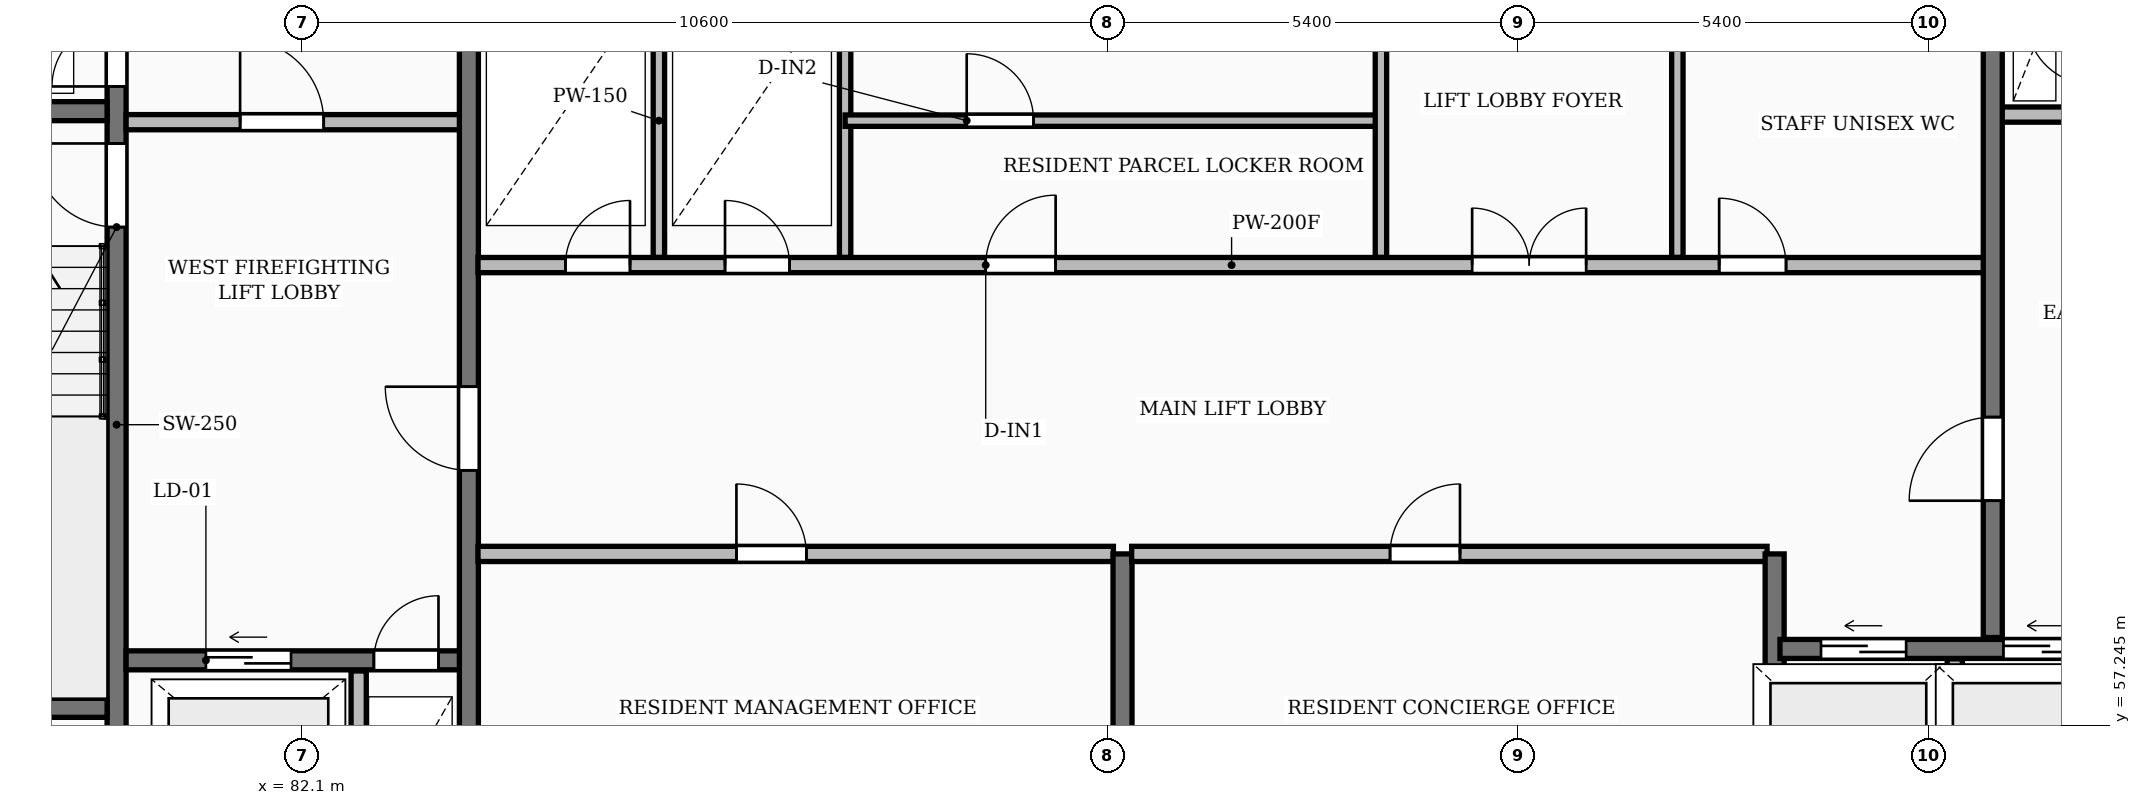
"""IFC4 building model, lengths in metres.
Left out: names, types, materials, properties, quantities, classifications, styles, units other than length and angle.
Written with IfcOpenShell. Run it as: python <this file> out.ifc"""

import sys

from ifc_helpers import new_model, si_unit, direction, frame, frame_2d, origin, place, context, subcontext, project, spatial, rectangle, extrude, element, fill, save


model = new_model("IFC4")
c1 = context("Model", 3, precision=1e-05, world=origin(), true_north=direction((0.0, 1.0)))
c2 = subcontext(c1, "Body", "Model", "MODEL_VIEW")
j1 = project(units=[si_unit("LENGTHUNIT", "METRE"), si_unit("PLANEANGLEUNIT", "RADIAN")], contexts=[c1])
p1 = place(None, origin())
s1 = spatial("IfcSite", under=j1, at=p1, CompositionType="ELEMENT")
p2 = place(p1, origin())
s2 = spatial("IfcBuilding", under=s1, at=p2, CompositionType="ELEMENT")
p3 = place(p2, frame((0.0, 0.0, 214.1)))
s3 = spatial("IfcBuildingStorey", under=s2, at=p3, CompositionType="ELEMENT", Elevation=214.1)
p4 = place(p3, frame((79.665, 55.4, 0.0), z_axis=(0.0, 0.0, 1.0), x_axis=(0.0, 1.0, 0.0)))
e1 = element("IfcWall", 1, at=p4, inside=s3, PredefinedType="SHEAR", context=c2, shape_type="SweptSolid", body=[
    extrude(rectangle(XDim=11.6, YDim=0.25, at=frame_2d((5.8, 0.0))), origin(), (0.0, 0.0, 1.0), 3.25),
])
p5 = place(p4, frame((0.55, 0.0, 0.0)))
e2 = element("IfcOpeningElement", 2, at=p5, cuts=e1, PredefinedType="OPENING", context=c2, shape_type="SweptSolid", body=[
    extrude(rectangle(XDim=0.85, YDim=2.05, at=frame_2d((0.425, 1.025))), frame((0.0, 0.135, 0.0), z_axis=(0.0, -1.0, 0.0), x_axis=(1.0, 0.0, 0.0)), (0.0, 0.0, 1.0), 0.27),
])
p6 = place(p4, frame((8.4, 0.0, 0.0)))
e3 = element("IfcOpeningElement", 3, at=p6, cuts=e1, PredefinedType="OPENING", context=c2, shape_type="SweptSolid", body=[
    extrude(rectangle(XDim=1.1, YDim=2.1, at=frame_2d((0.55, 1.05))), frame((0.0, 0.135, 0.0), z_axis=(0.0, -1.0, 0.0), x_axis=(1.0, 0.0, 0.0)), (0.0, 0.0, 1.0), 0.27),
])
p7 = place(p4, frame((10.25, 0.0, 0.0)))
e4 = element("IfcOpeningElement", 4, at=p7, cuts=e1, PredefinedType="OPENING", context=c2, shape_type="SweptSolid", body=[
    extrude(rectangle(XDim=0.85, YDim=2.05, at=frame_2d((0.425, 1.025))), frame((0.0, 0.135, 0.0), z_axis=(0.0, -1.0, 0.0), x_axis=(1.0, 0.0, 0.0)), (0.0, 0.0, 1.0), 0.27),
])
for number, where, z_axis, x_axis in (
    (5, (76.3, 57.475, 0.0), (0.0, 0.0, 1.0), (1.0, 0.0, 0.0)),
    (6, (76.3, 65.325, 0.0), (0.0, 0.0, 1.0), (1.0, 0.0, 0.0)),
):
    element("IfcWall", number, at=place(p3, frame(where, z_axis=z_axis, x_axis=x_axis)), inside=s3, PredefinedType="SHEAR", context=c2, shape_type="SweptSolid", body=[
        extrude(rectangle(XDim=3.24, YDim=0.25, at=frame_2d((1.62, 0.0))), origin(), (0.0, 0.0, 1.0), 3.25),
    ])
p8 = place(p3, frame((79.79, 58.1, 0.0), z_axis=(0.0, 0.0, 1.0), x_axis=(1.0, 0.0, 0.0)))
e7 = element("IfcWall", 7, at=p8, inside=s3, PredefinedType="SHEAR", context=c2, shape_type="SweptSolid", body=[
    extrude(rectangle(XDim=4.39, YDim=0.25, at=frame_2d((2.195, 0.0))), origin(), (0.0, 0.0, 1.0), 3.25),
])
p9 = place(p8, frame((1.05, 0.0, 0.0)))
e8 = element("IfcOpeningElement", 8, at=p9, cuts=e7, PredefinedType="OPENING", context=c2, shape_type="SweptSolid", body=[
    extrude(rectangle(XDim=1.12, YDim=2.12, at=frame_2d((0.56, 1.06))), frame((0.0, 0.135, 0.0), z_axis=(0.0, -1.0, 0.0), x_axis=(1.0, 0.0, 0.0)), (0.0, 0.0, 1.0), 0.27),
])
p10 = place(p8, frame((3.26, 0.0, 0.0)))
e9 = element("IfcOpeningElement", 9, at=p10, cuts=e7, PredefinedType="OPENING", context=c2, shape_type="SweptSolid", body=[
    extrude(rectangle(XDim=0.85, YDim=2.05, at=frame_2d((0.425, 1.025))), frame((0.0, 0.135, 0.0), z_axis=(0.0, -1.0, 0.0), x_axis=(1.0, 0.0, 0.0)), (0.0, 0.0, 1.0), 0.27),
])
p11 = place(p3, frame((82.85, 55.4, 0.0), z_axis=(0.0, 0.0, 1.0), x_axis=(0.0, 1.0, 0.0)))
e10 = element("IfcWall", 10, at=p11, inside=s3, PredefinedType="PARTITIONING", context=c2, shape_type="SweptSolid", body=[
    extrude(rectangle(XDim=2.56, YDim=0.2, at=frame_2d((1.28, 0.0))), origin(), (0.0, 0.0, 1.0), 2.97),
])
p12 = place(p3, frame((79.79, 65.18, 0.0), z_axis=(0.0, 0.0, 1.0), x_axis=(1.0, 0.0, 0.0)))
e11 = element("IfcWall", 11, at=p12, inside=s3, PredefinedType="PARTITIONING", context=c2, shape_type="SweptSolid", body=[
    extrude(rectangle(XDim=4.39, YDim=0.2, at=frame_2d((2.195, 0.0))), origin(), (0.0, 0.0, 1.0), 2.97),
])
p13 = place(p12, frame((1.5, 0.0, 0.0)))
e12 = element("IfcOpeningElement", 12, at=p13, cuts=e11, PredefinedType="OPENING", context=c2, shape_type="SweptSolid", body=[
    extrude(rectangle(XDim=1.1, YDim=2.1, at=frame_2d((0.55, 1.05))), frame((0.0, 0.11, 0.0), z_axis=(0.0, -1.0, 0.0), x_axis=(1.0, 0.0, 0.0)), (0.0, 0.0, 1.0), 0.22),
])
p14 = place(p3, frame((84.3, 55.4, 0.0), z_axis=(0.0, 0.0, 1.0), x_axis=(0.0, 1.0, 0.0)))
e13 = element("IfcWall", 13, at=p14, inside=s3, PredefinedType="SHEAR", context=c2, shape_type="SweptSolid", body=[
    extrude(rectangle(XDim=11.6, YDim=0.25, at=frame_2d((5.8, 0.0))), origin(), (0.0, 0.0, 1.0), 3.25),
])
p15 = place(p14, frame((5.2, 0.0, 0.0)))
e14 = element("IfcOpeningElement", 14, at=p15, cuts=e13, PredefinedType="OPENING", context=c2, shape_type="SweptSolid", body=[
    extrude(rectangle(XDim=1.1, YDim=2.1, at=frame_2d((0.55, 1.05))), frame((0.0, 0.135, 0.0), z_axis=(0.0, -1.0, 0.0), x_axis=(1.0, 0.0, 0.0)), (0.0, 0.0, 1.0), 0.27),
])
p16 = place(p3, frame((84.42, 59.5, 0.0), z_axis=(0.0, 0.0, 1.0), x_axis=(1.0, 0.0, 0.0)))
e15 = element("IfcWall", 15, at=p16, inside=s3, PredefinedType="PARTITIONING", context=c2, shape_type="SweptSolid", body=[
    extrude(rectangle(XDim=8.36, YDim=0.2, at=frame_2d((4.18, 0.0))), origin(), (0.0, 0.0, 1.0), 2.97),
])
p17 = place(p16, frame((3.4, 0.0, 0.0)))
e16 = element("IfcOpeningElement", 16, at=p17, cuts=e15, PredefinedType="OPENING", context=c2, shape_type="SweptSolid", body=[
    extrude(rectangle(XDim=0.92, YDim=2.08, at=frame_2d((0.46, 1.04))), frame((0.0, 0.11, 0.0), z_axis=(0.0, -1.0, 0.0), x_axis=(1.0, 0.0, 0.0)), (0.0, 0.0, 1.0), 0.22),
])
p18 = place(p3, frame((92.9, 55.4, 0.0), z_axis=(0.0, 0.0, 1.0), x_axis=(0.0, 1.0, 0.0)))
e17 = element("IfcWall", 17, at=p18, inside=s3, PredefinedType="SHEAR", context=c2, shape_type="SweptSolid", body=[
    extrude(rectangle(XDim=4.1, YDim=0.25, at=frame_2d((2.05, 0.0))), origin(), (0.0, 0.0, 1.0), 3.25),
])
p19 = place(p3, frame((93.02, 59.5, 0.0), z_axis=(0.0, 0.0, 1.0), x_axis=(1.0, 0.0, 0.0)))
e18 = element("IfcWall", 18, at=p19, inside=s3, PredefinedType="PARTITIONING", context=c2, shape_type="SweptSolid", body=[
    extrude(rectangle(XDim=8.36, YDim=0.2, at=frame_2d((4.18, 0.0))), origin(), (0.0, 0.0, 1.0), 2.97),
])
p20 = place(p19, frame((3.4, 0.0, 0.0)))
e19 = element("IfcOpeningElement", 19, at=p20, cuts=e18, PredefinedType="OPENING", context=c2, shape_type="SweptSolid", body=[
    extrude(rectangle(XDim=0.92, YDim=2.08, at=frame_2d((0.46, 1.04))), frame((0.0, 0.11, 0.0), z_axis=(0.0, -1.0, 0.0), x_axis=(1.0, 0.0, 0.0)), (0.0, 0.0, 1.0), 0.22),
])
p21 = place(p3, frame((101.48, 55.4, 0.0), z_axis=(0.0, 0.0, 1.0), x_axis=(0.0, 1.0, 0.0)))
e20 = element("IfcWall", 20, at=p21, inside=s3, PredefinedType="SHEAR", context=c2, shape_type="SweptSolid", body=[
    extrude(rectangle(XDim=4.1, YDim=0.25, at=frame_2d((2.05, 0.0))), origin(), (0.0, 0.0, 1.0), 3.25),
])
p22 = place(p3, frame((103.85, 55.4, 0.0), z_axis=(0.0, 0.0, 1.0), x_axis=(0.0, 1.0, 0.0)))
e21 = element("IfcWall", 21, at=p22, inside=s3, PredefinedType="PARTITIONING", context=c2, shape_type="SweptSolid", body=[
    extrude(rectangle(XDim=2.72, YDim=0.2, at=frame_2d((1.36, 0.0))), origin(), (0.0, 0.0, 1.0), 2.97),
])
p23 = place(p3, frame((101.55, 58.25, 0.0), z_axis=(0.0, 0.0, 1.0), x_axis=(1.0, 0.0, 0.0)))
e22 = element("IfcWall", 22, at=p23, inside=s3, PredefinedType="SHEAR", context=c2, shape_type="SweptSolid", body=[
    extrude(rectangle(XDim=4.6, YDim=0.25, at=frame_2d((2.3, 0.0))), origin(), (0.0, 0.0, 1.0), 3.25),
])
p24 = place(p23, frame((0.54, 0.0, 0.0)))
e23 = element("IfcOpeningElement", 23, at=p24, cuts=e22, PredefinedType="OPENING", context=c2, shape_type="SweptSolid", body=[
    extrude(rectangle(XDim=1.12, YDim=2.12, at=frame_2d((0.56, 1.06))), frame((0.0, 0.135, 0.0), z_axis=(0.0, -1.0, 0.0), x_axis=(1.0, 0.0, 0.0)), (0.0, 0.0, 1.0), 0.27),
])
p25 = place(p23, frame((2.94, 0.0, 0.0)))
e24 = element("IfcOpeningElement", 24, at=p25, cuts=e22, PredefinedType="OPENING", context=c2, shape_type="SweptSolid", body=[
    extrude(rectangle(XDim=1.12, YDim=2.12, at=frame_2d((0.56, 1.06))), frame((0.0, 0.135, 0.0), z_axis=(0.0, -1.0, 0.0), x_axis=(1.0, 0.0, 0.0)), (0.0, 0.0, 1.0), 0.27),
])
for number, where, z_axis, x_axis in (
    (25, (86.8, 63.4, 0.0), (0.0, 0.0, 1.0), (0.0, 1.0, 0.0)),
    (26, (89.25, 63.4, 0.0), (0.0, 0.0, 1.0), (0.0, 1.0, 0.0)),
):
    element("IfcWall", number, at=place(p3, frame(where, z_axis=z_axis, x_axis=x_axis)), inside=s3, PredefinedType="PARTITIONING", context=c2, shape_type="SweptSolid", body=[
        extrude(rectangle(XDim=3.6, YDim=0.15, at=frame_2d((1.8, 0.0))), origin(), (0.0, 0.0, 1.0), 2.97),
    ])
p26 = place(p3, frame((89.25, 65.2, 0.0), z_axis=(0.0, 0.0, 1.0), x_axis=(1.0, 0.0, 0.0)))
e27 = element("IfcWall", 27, at=p26, inside=s3, PredefinedType="PARTITIONING", context=c2, shape_type="SweptSolid", body=[
    extrude(rectangle(XDim=7.05, YDim=0.15, at=frame_2d((3.525, 0.0))), origin(), (0.0, 0.0, 1.0), 2.97),
])
p27 = place(p26, frame((1.6, 0.0, 0.0)))
e28 = element("IfcOpeningElement", 28, at=p27, cuts=e27, PredefinedType="OPENING", context=c2, shape_type="SweptSolid", body=[
    extrude(rectangle(XDim=0.88, YDim=2.06, at=frame_2d((0.44, 1.03))), frame((0.0, 0.085, 0.0), z_axis=(0.0, -1.0, 0.0), x_axis=(1.0, 0.0, 0.0)), (0.0, 0.0, 1.0), 0.17),
])
for number, where, z_axis, x_axis in (
    (29, (96.3, 63.4, 0.0), (0.0, 0.0, 1.0), (0.0, 1.0, 0.0)),
    (30, (100.2, 63.4, 0.0), (0.0, 0.0, 1.0), (0.0, 1.0, 0.0)),
):
    element("IfcWall", number, at=place(p3, frame(where, z_axis=z_axis, x_axis=x_axis)), inside=s3, PredefinedType="PARTITIONING", context=c2, shape_type="SweptSolid", body=[
        extrude(rectangle(XDim=3.6, YDim=0.15, at=frame_2d((1.8, 0.0))), origin(), (0.0, 0.0, 1.0), 2.97),
    ])
p28 = place(p3, frame((84.42, 63.3, 0.0), z_axis=(0.0, 0.0, 1.0), x_axis=(1.0, 0.0, 0.0)))
e31 = element("IfcWall", 31, at=p28, inside=s3, PredefinedType="PARTITIONING", context=c2, shape_type="SweptSolid", body=[
    extrude(rectangle(XDim=19.83, YDim=0.2, at=frame_2d((9.915, 0.0))), origin(), (0.0, 0.0, 1.0), 2.97),
])
p29 = place(p28, frame((1.15, 0.0, 0.0)))
e32 = element("IfcOpeningElement", 32, at=p29, cuts=e31, PredefinedType="OPENING", context=c2, shape_type="SweptSolid", body=[
    extrude(rectangle(XDim=0.85, YDim=2.05, at=frame_2d((0.425, 1.025))), frame((0.0, 0.11, 0.0), z_axis=(0.0, -1.0, 0.0), x_axis=(1.0, 0.0, 0.0)), (0.0, 0.0, 1.0), 0.22),
])
p30 = place(p28, frame((3.25, 0.0, 0.0)))
e33 = element("IfcOpeningElement", 33, at=p30, cuts=e31, PredefinedType="OPENING", context=c2, shape_type="SweptSolid", body=[
    extrude(rectangle(XDim=0.85, YDim=2.05, at=frame_2d((0.425, 1.025))), frame((0.0, 0.11, 0.0), z_axis=(0.0, -1.0, 0.0), x_axis=(1.0, 0.0, 0.0)), (0.0, 0.0, 1.0), 0.22),
])
p31 = place(p28, frame((13.08, 0.0, 0.0)))
e34 = element("IfcOpeningElement", 34, at=p31, cuts=e31, PredefinedType="OPENING", context=c2, shape_type="SweptSolid", body=[
    extrude(rectangle(XDim=1.5, YDim=2.2, at=frame_2d((0.75, 1.1))), frame((0.0, 0.11, 0.0), z_axis=(0.0, -1.0, 0.0), x_axis=(1.0, 0.0, 0.0)), (0.0, 0.0, 1.0), 0.22),
])
p32 = place(p28, frame((6.68, 0.0, 0.0)))
e35 = element("IfcOpeningElement", 35, at=p32, cuts=e31, PredefinedType="OPENING", context=c2, shape_type="SweptSolid", body=[
    extrude(rectangle(XDim=0.92, YDim=2.08, at=frame_2d((0.46, 1.04))), frame((0.0, 0.11, 0.0), z_axis=(0.0, -1.0, 0.0), x_axis=(1.0, 0.0, 0.0)), (0.0, 0.0, 1.0), 0.22),
])
p33 = place(p28, frame((16.33, 0.0, 0.0)))
e36 = element("IfcOpeningElement", 36, at=p33, cuts=e31, PredefinedType="OPENING", context=c2, shape_type="SweptSolid", body=[
    extrude(rectangle(XDim=0.88, YDim=2.06, at=frame_2d((0.44, 1.03))), frame((0.0, 0.11, 0.0), z_axis=(0.0, -1.0, 0.0), x_axis=(1.0, 0.0, 0.0)), (0.0, 0.0, 1.0), 0.22),
])
p34 = place(p3, frame((104.45, 65.28, 0.0), z_axis=(0.0, 0.0, 1.0), x_axis=(1.0, 0.0, 0.0)))
e37 = element("IfcWall", 37, at=p34, inside=s3, PredefinedType="PARTITIONING", context=c2, shape_type="SweptSolid", body=[
    extrude(rectangle(XDim=1.2, YDim=0.2, at=frame_2d((0.6, 0.0))), origin(), (0.0, 0.0, 1.0), 2.97),
])
p35 = place(p3, frame((104.35, 58.4, 0.0), z_axis=(0.0, 0.0, 1.0), x_axis=(0.0, 1.0, 0.0)))
e38 = element("IfcWall", 38, at=p35, inside=s3, PredefinedType="SHEAR", context=c2, shape_type="SweptSolid", body=[
    extrude(rectangle(XDim=8.6, YDim=0.25, at=frame_2d((4.3, 0.0))), origin(), (0.0, 0.0, 1.0), 3.25),
])
p36 = place(p35, frame((1.8, 0.0, 0.0)))
e39 = element("IfcOpeningElement", 39, at=p36, cuts=e38, PredefinedType="OPENING", context=c2, shape_type="SweptSolid", body=[
    extrude(rectangle(XDim=1.1, YDim=2.1, at=frame_2d((0.55, 1.05))), frame((0.0, 0.135, 0.0), z_axis=(0.0, -1.0, 0.0), x_axis=(1.0, 0.0, 0.0)), (0.0, 0.0, 1.0), 0.27),
])
p37 = place(p6, origin())
e40 = element("IfcDoor", 40, at=p37, inside=s3, OperationType="SINGLE_SWING_RIGHT", PredefinedType="DOOR", context=c2, shape_type="SweptSolid", body=[
    extrude(rectangle(XDim=1.1, YDim=2.1, at=frame_2d((0.55, 1.05))), frame((0.0, 0.025, 0.0), z_axis=(0.0, -1.0, 0.0), x_axis=(1.0, 0.0, 0.0)), (0.0, 0.0, 1.0), 0.05),
])
fill(e3, e40)
p38 = place(p7, origin())
e41 = element("IfcDoor", 41, at=p38, inside=s3, OperationType="SINGLE_SWING_LEFT", PredefinedType="DOOR", context=c2, shape_type="SweptSolid", body=[
    extrude(rectangle(XDim=0.85, YDim=2.05, at=frame_2d((0.425, 1.025))), frame((0.0, 0.025, 0.0), z_axis=(0.0, -1.0, 0.0), x_axis=(1.0, 0.0, 0.0)), (0.0, 0.0, 1.0), 0.05),
])
fill(e4, e41)
p39 = place(p9, origin())
e42 = element("IfcDoor", 42, at=p39, inside=s3, OperationType="SLIDING_TO_LEFT", PredefinedType="DOOR", context=c2, shape_type="SweptSolid", body=[
    extrude(rectangle(XDim=1.12, YDim=2.12, at=frame_2d((0.56, 1.06))), frame((0.0, 0.025, 0.0), z_axis=(0.0, -1.0, 0.0), x_axis=(1.0, 0.0, 0.0)), (0.0, 0.0, 1.0), 0.05),
])
fill(e8, e42)
p40 = place(p10, origin())
e43 = element("IfcDoor", 43, at=p40, inside=s3, OperationType="SINGLE_SWING_RIGHT", PredefinedType="DOOR", context=c2, shape_type="SweptSolid", body=[
    extrude(rectangle(XDim=0.85, YDim=2.05, at=frame_2d((0.425, 1.025))), frame((0.0, 0.025, 0.0), z_axis=(0.0, -1.0, 0.0), x_axis=(1.0, 0.0, 0.0)), (0.0, 0.0, 1.0), 0.05),
])
fill(e9, e43)
p41 = place(p13, origin())
e44 = element("IfcDoor", 44, at=p41, inside=s3, OperationType="SINGLE_SWING_LEFT", PredefinedType="DOOR", context=c2, shape_type="SweptSolid", body=[
    extrude(rectangle(XDim=1.1, YDim=2.1, at=frame_2d((0.55, 1.05))), frame((0.0, 0.025, 0.0), z_axis=(0.0, -1.0, 0.0), x_axis=(1.0, 0.0, 0.0)), (0.0, 0.0, 1.0), 0.05),
])
fill(e12, e44)
p42 = place(p15, origin())
e45 = element("IfcDoor", 45, at=p42, inside=s3, OperationType="SINGLE_SWING_RIGHT", PredefinedType="DOOR", context=c2, shape_type="SweptSolid", body=[
    extrude(rectangle(XDim=1.1, YDim=2.1, at=frame_2d((0.55, 1.05))), frame((0.0, 0.025, 0.0), z_axis=(0.0, -1.0, 0.0), x_axis=(1.0, 0.0, 0.0)), (0.0, 0.0, 1.0), 0.05),
])
fill(e14, e45)
p43 = place(p17, origin())
e46 = element("IfcDoor", 46, at=p43, inside=s3, OperationType="SINGLE_SWING_LEFT", PredefinedType="DOOR", context=c2, shape_type="SweptSolid", body=[
    extrude(rectangle(XDim=0.92, YDim=2.08, at=frame_2d((0.46, 1.04))), frame((0.0, 0.025, 0.0), z_axis=(0.0, -1.0, 0.0), x_axis=(1.0, 0.0, 0.0)), (0.0, 0.0, 1.0), 0.05),
])
fill(e16, e46)
p44 = place(p20, origin())
e47 = element("IfcDoor", 47, at=p44, inside=s3, OperationType="SINGLE_SWING_RIGHT", PredefinedType="DOOR", context=c2, shape_type="SweptSolid", body=[
    extrude(rectangle(XDim=0.92, YDim=2.08, at=frame_2d((0.46, 1.04))), frame((0.0, 0.025, 0.0), z_axis=(0.0, -1.0, 0.0), x_axis=(1.0, 0.0, 0.0)), (0.0, 0.0, 1.0), 0.05),
])
fill(e19, e47)
p45 = place(p24, origin())
e48 = element("IfcDoor", 48, at=p45, inside=s3, OperationType="SLIDING_TO_LEFT", PredefinedType="DOOR", context=c2, shape_type="SweptSolid", body=[
    extrude(rectangle(XDim=1.12, YDim=2.12, at=frame_2d((0.56, 1.06))), frame((0.0, 0.025, 0.0), z_axis=(0.0, -1.0, 0.0), x_axis=(1.0, 0.0, 0.0)), (0.0, 0.0, 1.0), 0.05),
])
fill(e23, e48)
p46 = place(p25, origin())
e49 = element("IfcDoor", 49, at=p46, inside=s3, OperationType="SLIDING_TO_LEFT", PredefinedType="DOOR", context=c2, shape_type="SweptSolid", body=[
    extrude(rectangle(XDim=1.12, YDim=2.12, at=frame_2d((0.56, 1.06))), frame((0.0, 0.025, 0.0), z_axis=(0.0, -1.0, 0.0), x_axis=(1.0, 0.0, 0.0)), (0.0, 0.0, 1.0), 0.05),
])
fill(e24, e49)
p47 = place(p27, origin())
e50 = element("IfcDoor", 50, at=p47, inside=s3, OperationType="SINGLE_SWING_LEFT", PredefinedType="DOOR", context=c2, shape_type="SweptSolid", body=[
    extrude(rectangle(XDim=0.88, YDim=2.06, at=frame_2d((0.44, 1.03))), frame((0.0, 0.025, 0.0), z_axis=(0.0, -1.0, 0.0), x_axis=(1.0, 0.0, 0.0)), (0.0, 0.0, 1.0), 0.05),
])
fill(e28, e50)
p48 = place(p29, origin())
e51 = element("IfcDoor", 51, at=p48, inside=s3, OperationType="SINGLE_SWING_RIGHT", PredefinedType="DOOR", context=c2, shape_type="SweptSolid", body=[
    extrude(rectangle(XDim=0.85, YDim=2.05, at=frame_2d((0.425, 1.025))), frame((0.0, 0.025, 0.0), z_axis=(0.0, -1.0, 0.0), x_axis=(1.0, 0.0, 0.0)), (0.0, 0.0, 1.0), 0.05),
])
fill(e32, e51)
p49 = place(p30, origin())
e52 = element("IfcDoor", 52, at=p49, inside=s3, OperationType="SINGLE_SWING_LEFT", PredefinedType="DOOR", context=c2, shape_type="SweptSolid", body=[
    extrude(rectangle(XDim=0.85, YDim=2.05, at=frame_2d((0.425, 1.025))), frame((0.0, 0.025, 0.0), z_axis=(0.0, -1.0, 0.0), x_axis=(1.0, 0.0, 0.0)), (0.0, 0.0, 1.0), 0.05),
])
fill(e33, e52)
p50 = place(p31, origin())
e53 = element("IfcDoor", 53, at=p50, inside=s3, OperationType="DOUBLE_DOOR_SINGLE_SWING", PredefinedType="DOOR", context=c2, shape_type="SweptSolid", body=[
    extrude(rectangle(XDim=1.5, YDim=2.2, at=frame_2d((0.75, 1.1))), frame((0.0, 0.025, 0.0), z_axis=(0.0, -1.0, 0.0), x_axis=(1.0, 0.0, 0.0)), (0.0, 0.0, 1.0), 0.05),
])
fill(e34, e53)
p51 = place(p32, origin())
e54 = element("IfcDoor", 54, at=p51, inside=s3, OperationType="SINGLE_SWING_RIGHT", PredefinedType="DOOR", context=c2, shape_type="SweptSolid", body=[
    extrude(rectangle(XDim=0.92, YDim=2.08, at=frame_2d((0.46, 1.04))), frame((0.0, 0.025, 0.0), z_axis=(0.0, -1.0, 0.0), x_axis=(1.0, 0.0, 0.0)), (0.0, 0.0, 1.0), 0.05),
])
fill(e35, e54)
p52 = place(p33, origin())
e55 = element("IfcDoor", 55, at=p52, inside=s3, OperationType="SINGLE_SWING_LEFT", PredefinedType="DOOR", context=c2, shape_type="SweptSolid", body=[
    extrude(rectangle(XDim=0.88, YDim=2.06, at=frame_2d((0.44, 1.03))), frame((0.0, 0.025, 0.0), z_axis=(0.0, -1.0, 0.0), x_axis=(1.0, 0.0, 0.0)), (0.0, 0.0, 1.0), 0.05),
])
fill(e36, e55)
p53 = place(p36, origin())
e56 = element("IfcDoor", 56, at=p53, inside=s3, OperationType="SINGLE_SWING_LEFT", PredefinedType="DOOR", context=c2, shape_type="SweptSolid", body=[
    extrude(rectangle(XDim=1.1, YDim=2.1, at=frame_2d((0.55, 1.05))), frame((0.0, 0.025, 0.0), z_axis=(0.0, -1.0, 0.0), x_axis=(1.0, 0.0, 0.0)), (0.0, 0.0, 1.0), 0.05),
])
fill(e39, e56)
save(model, sys.argv[1])
